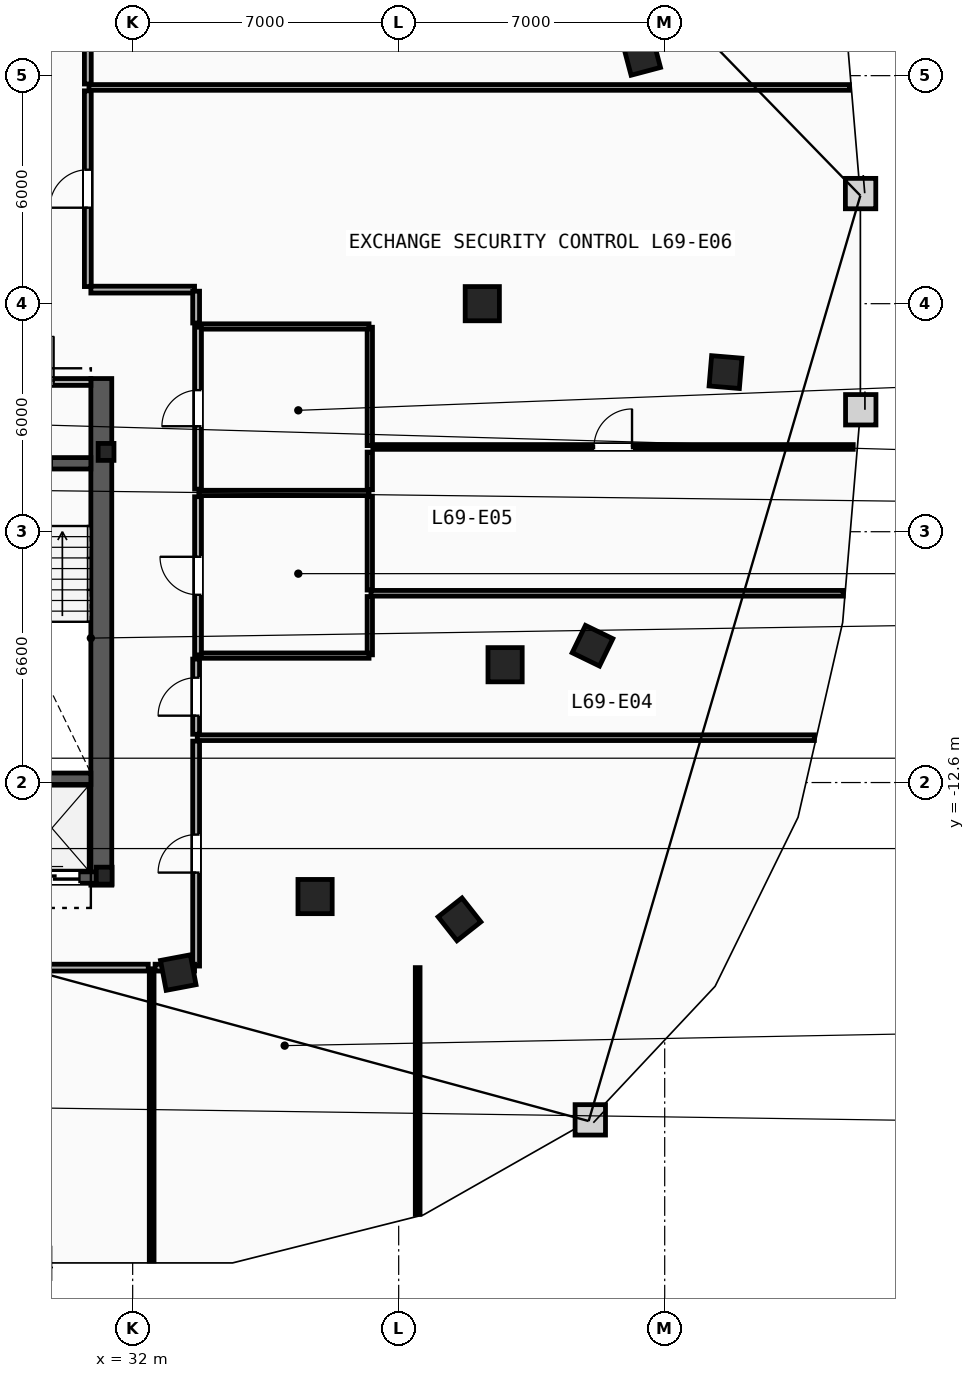
"""IFC4 building model, lengths in metres.
Left out: names, types, materials, properties, quantities, classifications, styles, units other than length and angle.
Written with IfcOpenShell. Run it as: python <this file> out.ifc"""

import sys

from ifc_helpers import new_model, si_unit, direction, frame, frame_2d, origin, origin_2d, place, context, subcontext, project, spatial, rectangle, i_section, extrude, element, fill, save


model = new_model("IFC4")
c1 = context("Model", 3, precision=1e-05, world=origin(), true_north=direction((0.0, 1.0)))
c2 = subcontext(c1, "Body", "Model", "MODEL_VIEW")
j1 = project(units=[si_unit("LENGTHUNIT", "METRE"), si_unit("PLANEANGLEUNIT", "RADIAN")], contexts=[c1])
p1 = place(None, origin())
s1 = spatial("IfcSite", under=j1, at=p1, CompositionType="ELEMENT")
p2 = place(p1, origin())
s2 = spatial("IfcBuilding", under=s1, at=p2, CompositionType="ELEMENT")
p3 = place(p2, frame((0.0, 0.0, 261.2)))
s3 = spatial("IfcBuildingStorey", under=s2, at=p3, CompositionType="ELEMENT", Elevation=261.2)
for number, where, z_axis, x_axis in (
    (1, (31.3, -3.9, 0.0), (0.0, 0.0, 1.0), (1.0, 0.0, 0.0)),
    (2, (31.25, -15.05, 0.0), (0.0, 0.0, 1.0), (1.0, 0.0, 0.0)),
):
    element("IfcColumn", number, at=place(p3, frame(where, z_axis=z_axis, x_axis=x_axis)), inside=s3, PredefinedType="COLUMN", context=c2, shape_type="SweptSolid", body=[
        extrude(i_section(OverallWidth=0.416, OverallDepth=0.446, WebThickness=0.039, FlangeThickness=0.063, FilletRadius=0.018, at=origin_2d()), origin(), (0.0, 0.0, 1.0), 3.6),
    ])
for number, where, z_axis, x_axis in (
    (3, (41.2, 0.0, 0.0), (0.0, 0.0, 1.0), (1.0, 0.0, 0.0)),
    (4, (41.8, -9.5, 0.0), (0.0, 0.0, 1.0), (1.0, 0.0, 0.0)),
    (5, (36.8, -15.6, 0.0), (0.0, 0.0, 1.0), (1.0, 0.0, 0.0)),
):
    element("IfcColumn", number, at=place(p3, frame(where, z_axis=z_axis, x_axis=x_axis)), inside=s3, PredefinedType="COLUMN", context=c2, shape_type="SweptSolid", body=[
        extrude(rectangle(XDim=0.9, YDim=0.9, at=origin_2d()), origin(), (0.0, 0.0, 1.0), 3.6),
    ])
for number, where, z_axis, x_axis in (
    (6, (33.2, -17.6, 0.0), (0.0, 0.0, 1.0), (0.983, 0.186, 0.0)),
    (7, (40.6, -16.2, 0.0), (0.0, 0.0, 1.0), (0.785, 0.619, 0.0)),
    (8, (44.1, -9.0, 0.0), (0.0, 0.0, 1.0), (0.437, 0.899, 0.0)),
    (9, (47.6, -1.8, 0.0), (0.0, 0.0, 1.0), (0.084, 0.997, 0.0)),
    (10, (45.4, 6.5, 0.0), (0.0, 0.0, 1.0), (-0.256, 0.967, 0.0)),
):
    element("IfcColumn", number, at=place(p3, frame(where, z_axis=z_axis, x_axis=x_axis)), inside=s3, PredefinedType="COLUMN", context=c2, shape_type="SweptSolid", body=[
        extrude(rectangle(XDim=0.8, YDim=0.8, at=origin_2d()), origin(), (0.0, 0.0, 1.0), 3.6),
    ])
p4 = place(p3, frame((31.175, -15.3, 0.0), z_axis=(0.0, 0.0, 1.0), x_axis=(0.0, 1.0, 0.0)))
e11 = element("IfcWall", 11, at=p4, inside=s3, PredefinedType="SHEAR", context=c2, shape_type="SweptSolid", body=[
    extrude(rectangle(XDim=13.33, YDim=0.55, at=frame_2d((6.665, 0.0))), origin(), (0.0, 0.0, 1.0), 3.34),
])
p5 = place(p3, frame((27.74, -4.2, 0.0), z_axis=(0.0, 0.0, 1.0), x_axis=(1.0, 0.0, 0.0)))
e12 = element("IfcWall", 12, at=p5, inside=s3, PredefinedType="SHEAR", context=c2, shape_type="SweptSolid", body=[
    extrude(rectangle(XDim=3.16, YDim=0.3, at=frame_2d((1.58, 0.0))), origin(), (0.0, 0.0, 1.0), 3.34),
])
p6 = place(p5, frame((1.03, 0.0, 0.0)))
e13 = element("IfcOpeningElement", 13, at=p6, cuts=e12, PredefinedType="OPENING", context=c2, shape_type="SweptSolid", body=[
    extrude(rectangle(XDim=1.1, YDim=2.15, at=frame_2d((0.55, 1.075))), frame((0.0, 0.16, 0.0), z_axis=(0.0, -1.0, 0.0), x_axis=(1.0, 0.0, 0.0)), (0.0, 0.0, 1.0), 0.32),
])
p7 = place(p3, frame((27.74, -12.5, 0.0), z_axis=(0.0, 0.0, 1.0), x_axis=(1.0, 0.0, 0.0)))
e14 = element("IfcWall", 14, at=p7, inside=s3, PredefinedType="SHEAR", context=c2, shape_type="SweptSolid", body=[
    extrude(rectangle(XDim=3.16, YDim=0.3, at=frame_2d((1.58, 0.0))), origin(), (0.0, 0.0, 1.0), 3.34),
])
p8 = place(p3, frame((27.74, -2.06, 0.0), z_axis=(0.0, 0.0, 1.0), x_axis=(1.0, 0.0, 0.0)))
e15 = element("IfcWall", 15, at=p8, inside=s3, PredefinedType="PARTITIONING", context=c2, shape_type="SweptSolid", body=[
    extrude(rectangle(XDim=3.16, YDim=0.18, at=frame_2d((1.58, 0.0))), origin(), (0.0, 0.0, 1.0), 3.34),
])
p9 = place(p8, frame((0.98, 0.0, 0.0)))
e16 = element("IfcOpeningElement", 16, at=p9, cuts=e15, PredefinedType="OPENING", context=c2, shape_type="SweptSolid", body=[
    extrude(rectangle(XDim=1.2, YDim=2.15, at=frame_2d((0.6, 1.075))), frame((0.0, 0.1, 0.0), z_axis=(0.0, -1.0, 0.0), x_axis=(1.0, 0.0, 0.0)), (0.0, 0.0, 1.0), 0.2),
])
p10 = place(p3, frame((28.7, -15.1, 0.0), z_axis=(0.0, 0.0, 1.0), x_axis=(1.0, 0.0, 0.0)))
e17 = element("IfcWall", 17, at=p10, inside=s3, PredefinedType="SHEAR", context=c2, shape_type="SweptSolid", body=[
    extrude(rectangle(XDim=2.5, YDim=0.3, at=frame_2d((1.25, 0.0))), origin(), (0.0, 0.0, 1.0), 3.34),
])
p11 = place(p10, frame((0.6, 0.0, 0.0)))
e18 = element("IfcOpeningElement", 18, at=p11, cuts=e17, PredefinedType="OPENING", context=c2, shape_type="SweptSolid", body=[
    extrude(rectangle(XDim=1.3, YDim=2.2, at=frame_2d((0.65, 1.1))), frame((0.0, 0.16, 0.0), z_axis=(0.0, -1.0, 0.0), x_axis=(1.0, 0.0, 0.0)), (0.0, 0.0, 1.0), 0.32),
])
p12 = place(p3, frame((38.24, -9.24, 0.0), z_axis=(0.0, 0.0, 1.0), x_axis=(0.0, 1.0, 0.0)))
e19 = element("IfcWall", 19, at=p12, inside=s3, PredefinedType="PARTITIONING", context=c2, shape_type="SweptSolid", body=[
    extrude(rectangle(XDim=1.535, YDim=0.14, at=frame_2d((0.768, 0.0))), origin(), (0.0, 0.0, 1.0), 3.34),
])
p13 = place(p3, frame((38.24, -7.535, 0.0), z_axis=(0.0, 0.0, 1.0), x_axis=(0.0, 1.0, 0.0)))
e20 = element("IfcWall", 20, at=p13, inside=s3, PredefinedType="PARTITIONING", context=c2, shape_type="SweptSolid", body=[
    extrude(rectangle(XDim=2.47, YDim=0.14, at=frame_2d((1.235, 0.0))), origin(), (0.0, 0.0, 1.0), 3.34),
])
p14 = place(p3, frame((38.24, -4.895, 0.0), z_axis=(0.0, 0.0, 1.0), x_axis=(0.0, 1.0, 0.0)))
e21 = element("IfcWall", 21, at=p14, inside=s3, PredefinedType="PARTITIONING", context=c2, shape_type="SweptSolid", body=[
    extrude(rectangle(XDim=0.99, YDim=0.14, at=frame_2d((0.495, 0.0))), origin(), (0.0, 0.0, 1.0), 3.34),
])
p15 = place(p3, frame((38.24, -3.735, 0.0), z_axis=(0.0, 0.0, 1.0), x_axis=(0.0, 1.0, 0.0)))
e22 = element("IfcWall", 22, at=p15, inside=s3, PredefinedType="PARTITIONING", context=c2, shape_type="SweptSolid", body=[
    extrude(rectangle(XDim=3.115, YDim=0.14, at=frame_2d((1.558, 0.0))), origin(), (0.0, 0.0, 1.0), 3.34),
])
for number, where, z_axis, x_axis in (
    (23, (33.74, -0.6, 0.0), (0.0, 0.0, 1.0), (1.0, 0.0, 0.0)),
    (24, (33.74, -4.98, 0.0), (0.0, 0.0, 1.0), (1.0, 0.0, 0.0)),
    (25, (33.74, -9.26, 0.0), (0.0, 0.0, 1.0), (1.0, 0.0, 0.0)),
):
    element("IfcWall", number, at=place(p3, frame(where, z_axis=z_axis, x_axis=x_axis)), inside=s3, PredefinedType="PARTITIONING", context=c2, shape_type="SweptSolid", body=[
        extrude(rectangle(XDim=4.48, YDim=0.14, at=frame_2d((2.24, 0.0))), origin(), (0.0, 0.0, 1.0), 3.34),
    ])
p16 = place(p3, frame((33.72, -4.88, 0.0), z_axis=(0.0, 0.0, 1.0), x_axis=(0.0, 1.0, 0.0)))
e26 = element("IfcWall", 26, at=p16, inside=s3, PredefinedType="PARTITIONING", context=c2, shape_type="SweptSolid", body=[
    extrude(rectangle(XDim=4.26, YDim=0.18, at=frame_2d((2.13, 0.0))), origin(), (0.0, 0.0, 1.0), 3.34),
])
p17 = place(p16, frame((1.655, 0.0, 0.0)))
e27 = element("IfcOpeningElement", 27, at=p17, cuts=e26, PredefinedType="OPENING", context=c2, shape_type="SweptSolid", body=[
    extrude(rectangle(XDim=0.95, YDim=2.1, at=frame_2d((0.475, 1.05))), frame((0.0, 0.1, 0.0), z_axis=(0.0, -1.0, 0.0), x_axis=(1.0, 0.0, 0.0)), (0.0, 0.0, 1.0), 0.2),
])
p18 = place(p3, frame((33.72, -9.24, 0.0), z_axis=(0.0, 0.0, 1.0), x_axis=(0.0, 1.0, 0.0)))
e28 = element("IfcWall", 28, at=p18, inside=s3, PredefinedType="PARTITIONING", context=c2, shape_type="SweptSolid", body=[
    extrude(rectangle(XDim=4.16, YDim=0.18, at=frame_2d((2.08, 0.0))), origin(), (0.0, 0.0, 1.0), 3.34),
])
p19 = place(p18, frame((1.58, 0.0, 0.0)))
e29 = element("IfcOpeningElement", 29, at=p19, cuts=e28, PredefinedType="OPENING", context=c2, shape_type="SweptSolid", body=[
    extrude(rectangle(XDim=1.0, YDim=2.15, at=frame_2d((0.5, 1.075))), frame((0.0, 0.1, 0.0), z_axis=(0.0, -1.0, 0.0), x_axis=(1.0, 0.0, 0.0)), (0.0, 0.0, 1.0), 0.2),
])
p20 = place(p3, frame((30.85, 5.69, 0.0), z_axis=(0.0, 0.0, 1.0), x_axis=(1.0, 0.0, 0.0)))
e30 = element("IfcWall", 30, at=p20, inside=s3, PredefinedType="PARTITIONING", context=c2, shape_type="SweptSolid", body=[
    extrude(rectangle(XDim=20.01, YDim=0.15, at=frame_2d((10.005, 0.0))), origin(), (0.0, 0.0, 1.0), 3.34),
])
p21 = place(p3, frame((38.27, -7.62, 0.0), z_axis=(0.0, 0.0, 1.0), x_axis=(1.0, 0.0, 0.0)))
e31 = element("IfcWall", 31, at=p21, inside=s3, PredefinedType="PARTITIONING", context=c2, shape_type="SweptSolid", body=[
    extrude(rectangle(XDim=12.427, YDim=0.15, at=frame_2d((6.214, 0.0))), origin(), (0.0, 0.0, 1.0), 3.34),
])
p22 = place(p3, frame((33.7, -11.42, 0.0), z_axis=(0.0, 0.0, 1.0), x_axis=(1.0, 0.0, 0.0)))
e32 = element("IfcWall", 32, at=p22, inside=s3, PredefinedType="PARTITIONING", context=c2, shape_type="SweptSolid", body=[
    extrude(rectangle(XDim=16.238, YDim=0.15, at=frame_2d((8.119, 0.0))), origin(), (0.0, 0.0, 1.0), 3.34),
])
p23 = place(p3, frame((32.5, -25.19, 0.0), z_axis=(0.0, 0.0, 1.0), x_axis=(0.0, 1.0, 0.0)))
e33 = element("IfcWall", 33, at=p23, inside=s3, PredefinedType="PARTITIONING", context=c2, shape_type="SweptSolid", body=[
    extrude(rectangle(XDim=7.69, YDim=0.125, at=frame_2d((3.845, 0.0))), origin(), (0.0, 0.0, 1.0), 3.34),
])
p24 = place(p3, frame((39.5, -23.963, 0.0), z_axis=(0.0, 0.0, 1.0), x_axis=(0.0, 1.0, 0.0)))
e34 = element("IfcWall", 34, at=p24, inside=s3, PredefinedType="PARTITIONING", context=c2, shape_type="SweptSolid", body=[
    extrude(rectangle(XDim=6.493, YDim=0.125, at=frame_2d((3.246, 0.0))), origin(), (0.0, 0.0, 1.0), 3.34),
])
p25 = place(p3, frame((24.59, -17.47, 0.0), z_axis=(0.0, 0.0, 1.0), x_axis=(1.0, 0.0, 0.0)))
e35 = element("IfcWall", 35, at=p25, inside=s3, PredefinedType="PARTITIONING", context=c2, shape_type="SweptSolid", body=[
    extrude(rectangle(XDim=7.82, YDim=0.18, at=frame_2d((3.91, 0.0))), origin(), (0.0, 0.0, 1.0), 3.34),
])
p26 = place(p25, frame((3.41, 0.0, 0.0)))
e36 = element("IfcOpeningElement", 36, at=p26, cuts=e35, PredefinedType="OPENING", context=c2, shape_type="SweptSolid", body=[
    extrude(rectangle(XDim=1.0, YDim=2.15, at=frame_2d((0.5, 1.075))), frame((0.0, 0.1, 0.0), z_axis=(0.0, -1.0, 0.0), x_axis=(1.0, 0.0, 0.0)), (0.0, 0.0, 1.0), 0.2),
])
p27 = place(p3, frame((33.67, -17.428, 0.0), z_axis=(0.0, 0.0, 1.0), x_axis=(0.0, 1.0, 0.0)))
e37 = element("IfcWall", 37, at=p27, inside=s3, PredefinedType="PARTITIONING", context=c2, shape_type="SweptSolid", body=[
    extrude(rectangle(XDim=5.918, YDim=0.18, at=frame_2d((2.959, 0.0))), origin(), (0.0, 0.0, 1.0), 3.34),
])
p28 = place(p27, frame((2.459, 0.0, 0.0)))
e38 = element("IfcOpeningElement", 38, at=p28, cuts=e37, PredefinedType="OPENING", context=c2, shape_type="SweptSolid", body=[
    extrude(rectangle(XDim=1.0, YDim=2.15, at=frame_2d((0.5, 1.075))), frame((0.0, 0.1, 0.0), z_axis=(0.0, -1.0, 0.0), x_axis=(1.0, 0.0, 0.0)), (0.0, 0.0, 1.0), 0.2),
])
p29 = place(p3, frame((32.59, -17.47, 0.0), z_axis=(0.0, 0.0, 1.0), x_axis=(1.0, 0.0, 0.0)))
e39 = element("IfcWall", 39, at=p29, inside=s3, PredefinedType="PARTITIONING", context=c2, shape_type="SweptSolid", body=[
    extrude(rectangle(XDim=1.038, YDim=0.18, at=frame_2d((0.519, 0.0))), origin(), (0.0, 0.0, 1.0), 3.34),
])
p30 = place(p3, frame((33.67, -11.33, 0.0), z_axis=(0.0, 0.0, 1.0), x_axis=(0.0, 1.0, 0.0)))
e40 = element("IfcWall", 40, at=p30, inside=s3, PredefinedType="PARTITIONING", context=c2, shape_type="SweptSolid", body=[
    extrude(rectangle(XDim=1.979, YDim=0.18, at=frame_2d((0.989, 0.0))), origin(), (0.0, 0.0, 1.0), 3.34),
])
p31 = place(p30, frame((0.489, 0.0, 0.0)))
e41 = element("IfcOpeningElement", 41, at=p31, cuts=e40, PredefinedType="OPENING", context=c2, shape_type="SweptSolid", body=[
    extrude(rectangle(XDim=1.0, YDim=2.15, at=frame_2d((0.5, 1.075))), frame((0.0, 0.1, 0.0), z_axis=(0.0, -1.0, 0.0), x_axis=(1.0, 0.0, 0.0)), (0.0, 0.0, 1.0), 0.2),
])
p32 = place(p3, frame((30.82, 0.45, 0.0), z_axis=(0.0, 0.0, 1.0), x_axis=(0.0, 1.0, 0.0)))
e42 = element("IfcWall", 42, at=p32, inside=s3, PredefinedType="PARTITIONING", context=c2, shape_type="SweptSolid", body=[
    extrude(rectangle(XDim=5.15, YDim=0.18, at=frame_2d((2.575, 0.0))), origin(), (0.0, 0.0, 1.0), 3.34),
])
p33 = place(p32, frame((2.075, 0.0, 0.0)))
e43 = element("IfcOpeningElement", 43, at=p33, cuts=e42, PredefinedType="OPENING", context=c2, shape_type="SweptSolid", body=[
    extrude(rectangle(XDim=1.0, YDim=2.15, at=frame_2d((0.5, 1.075))), frame((0.0, 0.1, 0.0), z_axis=(0.0, -1.0, 0.0), x_axis=(1.0, 0.0, 0.0)), (0.0, 0.0, 1.0), 0.2),
])
p34 = place(p3, frame((33.628, 0.37, 0.0), z_axis=(0.0, 0.0, 1.0), x_axis=(-1.0, 0.0, 0.0)))
e44 = element("IfcWall", 44, at=p34, inside=s3, PredefinedType="PARTITIONING", context=c2, shape_type="SweptSolid", body=[
    extrude(rectangle(XDim=2.729, YDim=0.18, at=frame_2d((1.364, 0.0))), origin(), (0.0, 0.0, 1.0), 3.34),
])
p35 = place(p3, frame((33.67, -0.509, 0.0), z_axis=(0.0, 0.0, 1.0), x_axis=(0.0, 1.0, 0.0)))
e45 = element("IfcWall", 45, at=p35, inside=s3, PredefinedType="PARTITIONING", context=c2, shape_type="SweptSolid", body=[
    extrude(rectangle(XDim=0.837, YDim=0.18, at=frame_2d((0.418, 0.0))), origin(), (0.0, 0.0, 1.0), 3.34),
])
p36 = place(p3, frame((30.82, 5.78, 0.0), z_axis=(0.0, 0.0, 1.0), x_axis=(0.0, 1.0, 0.0)))
e46 = element("IfcWall", 46, at=p36, inside=s3, PredefinedType="PARTITIONING", context=c2, shape_type="SweptSolid", body=[
    extrude(rectangle(XDim=6.999, YDim=0.18, at=frame_2d((3.499, 0.0))), origin(), (0.0, 0.0, 1.0), 3.34),
])
p37 = place(p3, frame((38.32, -3.77, 0.0), z_axis=(0.0, 0.0, 1.0), x_axis=(1.0, 0.0, 0.0)))
e47 = element("IfcWall", 47, at=p37, inside=s3, PredefinedType="PARTITIONING", context=c2, shape_type="SweptSolid", body=[
    extrude(rectangle(XDim=12.641, YDim=0.125, at=frame_2d((6.32, 0.0))), origin(), (0.0, 0.0, 1.0), 3.34),
])
p38 = place(p37, frame((5.82, 0.0, 0.0)))
e48 = element("IfcOpeningElement", 48, at=p38, cuts=e47, PredefinedType="OPENING", context=c2, shape_type="SweptSolid", body=[
    extrude(rectangle(XDim=1.0, YDim=2.15, at=frame_2d((0.5, 1.075))), frame((0.0, 0.073, 0.0), z_axis=(0.0, -1.0, 0.0), x_axis=(1.0, 0.0, 0.0)), (0.0, 0.0, 1.0), 0.145),
])
p39 = place(p9, origin())
e49 = element("IfcDoor", 49, at=p39, inside=s3, OperationType="SINGLE_SWING_RIGHT", PredefinedType="DOOR", context=c2, shape_type="SweptSolid", body=[
    extrude(rectangle(XDim=1.2, YDim=2.15, at=frame_2d((0.6, 1.075))), frame((0.0, 0.025, 0.0), z_axis=(0.0, -1.0, 0.0), x_axis=(1.0, 0.0, 0.0)), (0.0, 0.0, 1.0), 0.05),
])
fill(e16, e49)
p40 = place(p11, origin())
e50 = element("IfcDoor", 50, at=p40, inside=s3, OperationType="SLIDING_TO_LEFT", PredefinedType="TRAPDOOR", context=c2, shape_type="SweptSolid", body=[
    extrude(rectangle(XDim=1.3, YDim=2.2, at=frame_2d((0.65, 1.1))), frame((0.0, 0.025, 0.0), z_axis=(0.0, -1.0, 0.0), x_axis=(1.0, 0.0, 0.0)), (0.0, 0.0, 1.0), 0.05),
])
fill(e18, e50)
p41 = place(p38, origin())
e51 = element("IfcDoor", 51, at=p41, inside=s3, OperationType="SINGLE_SWING_RIGHT", PredefinedType="DOOR", context=c2, shape_type="SweptSolid", body=[
    extrude(rectangle(XDim=1.0, YDim=2.15, at=frame_2d((0.5, 1.075))), frame((0.0, 0.025, 0.0), z_axis=(0.0, -1.0, 0.0), x_axis=(1.0, 0.0, 0.0)), (0.0, 0.0, 1.0), 0.05),
])
fill(e48, e51)
p42 = place(p28, origin())
e52 = element("IfcDoor", 52, at=p42, inside=s3, OperationType="SINGLE_SWING_LEFT", PredefinedType="DOOR", context=c2, shape_type="SweptSolid", body=[
    extrude(rectangle(XDim=1.0, YDim=2.15, at=frame_2d((0.5, 1.075))), frame((0.0, 0.025, 0.0), z_axis=(0.0, -1.0, 0.0), x_axis=(1.0, 0.0, 0.0)), (0.0, 0.0, 1.0), 0.05),
])
fill(e38, e52)
p43 = place(p33, origin())
e53 = element("IfcDoor", 53, at=p43, inside=s3, OperationType="SINGLE_SWING_LEFT", PredefinedType="DOOR", context=c2, shape_type="SweptSolid", body=[
    extrude(rectangle(XDim=1.0, YDim=2.15, at=frame_2d((0.5, 1.075))), frame((0.0, 0.025, 0.0), z_axis=(0.0, -1.0, 0.0), x_axis=(1.0, 0.0, 0.0)), (0.0, 0.0, 1.0), 0.05),
])
fill(e43, e53)
p44 = place(p17, origin())
e54 = element("IfcDoor", 54, at=p44, inside=s3, OperationType="SINGLE_SWING_LEFT", PredefinedType="DOOR", context=c2, shape_type="SweptSolid", body=[
    extrude(rectangle(XDim=0.95, YDim=2.1, at=frame_2d((0.475, 1.05))), frame((0.0, 0.025, 0.0), z_axis=(0.0, -1.0, 0.0), x_axis=(1.0, 0.0, 0.0)), (0.0, 0.0, 1.0), 0.05),
])
fill(e27, e54)
p45 = place(p19, origin())
e55 = element("IfcDoor", 55, at=p45, inside=s3, OperationType="SINGLE_SWING_RIGHT", PredefinedType="DOOR", context=c2, shape_type="SweptSolid", body=[
    extrude(rectangle(XDim=1.0, YDim=2.15, at=frame_2d((0.5, 1.075))), frame((0.0, 0.025, 0.0), z_axis=(0.0, -1.0, 0.0), x_axis=(1.0, 0.0, 0.0)), (0.0, 0.0, 1.0), 0.05),
])
fill(e29, e55)
p46 = place(p31, origin())
e56 = element("IfcDoor", 56, at=p46, inside=s3, OperationType="SINGLE_SWING_LEFT", PredefinedType="DOOR", context=c2, shape_type="SweptSolid", body=[
    extrude(rectangle(XDim=1.0, YDim=2.15, at=frame_2d((0.5, 1.075))), frame((0.0, 0.025, 0.0), z_axis=(0.0, -1.0, 0.0), x_axis=(1.0, 0.0, 0.0)), (0.0, 0.0, 1.0), 0.05),
])
fill(e41, e56)
save(model, sys.argv[1])
